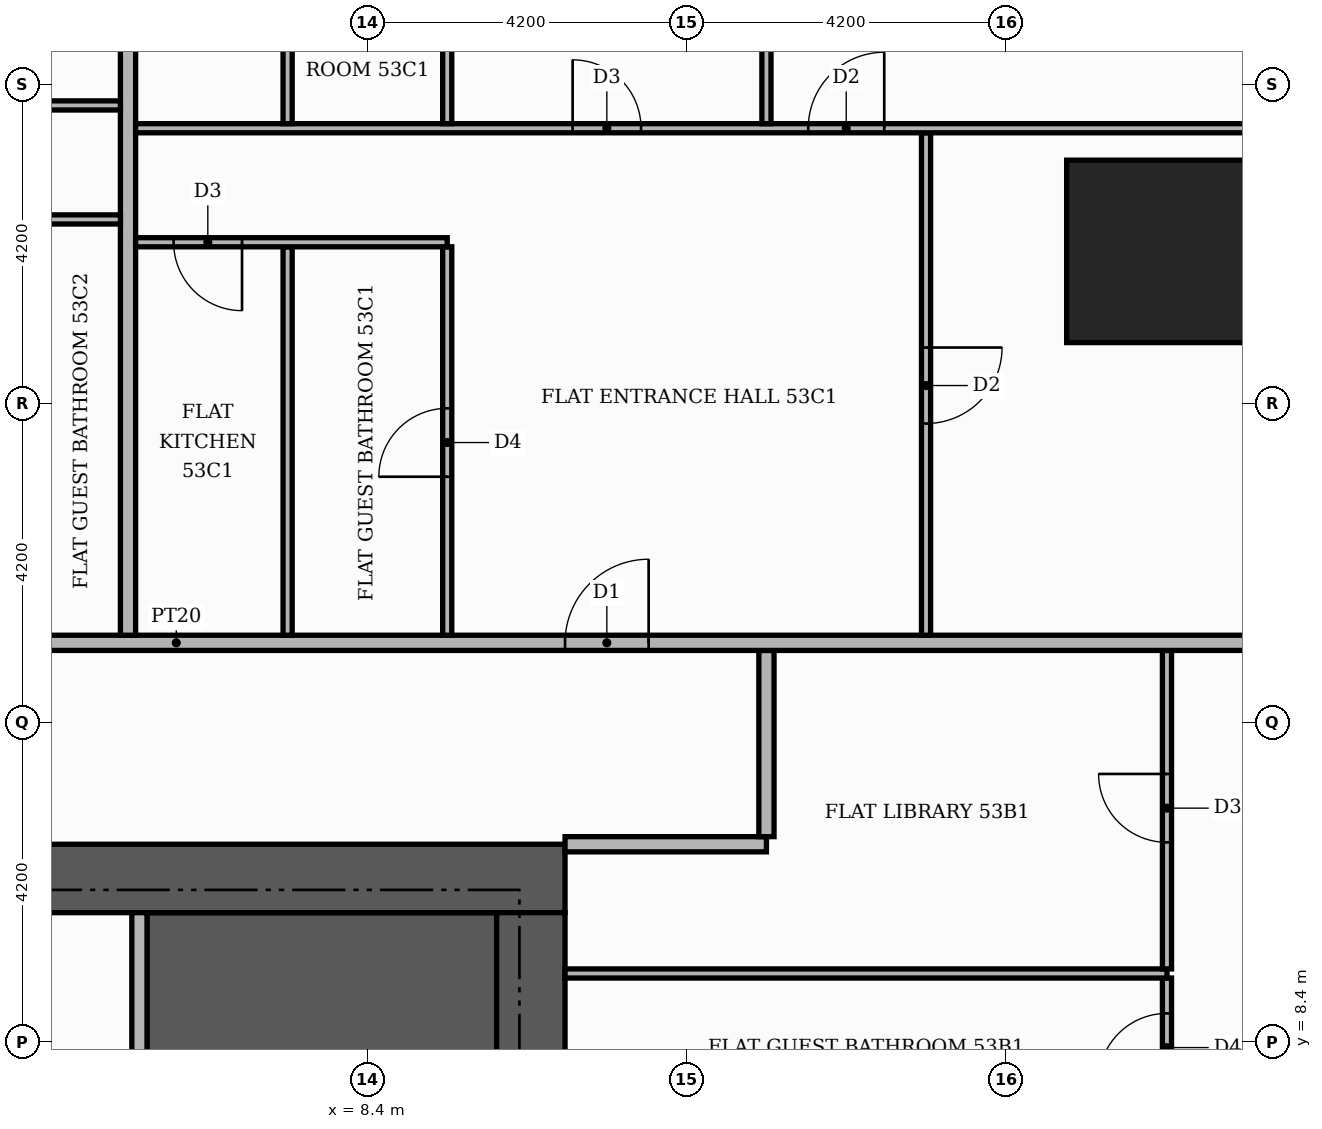
"""IFC4 building model, lengths in metres.
Left out: names, types, materials, properties, quantities, classifications, styles, units other than length and angle.
Written with IfcOpenShell. Run it as: python <this file> out.ifc"""

import sys

from ifc_helpers import new_model, si_unit, direction, frame, frame_2d, origin, origin_2d, place, context, subcontext, project, spatial, rectangle, extrude, element, fill, save


model = new_model("IFC4")
c1 = context("Model", 3, precision=1e-05, world=origin(), true_north=direction((0.0, 1.0)))
c2 = subcontext(c1, "Body", "Model", "MODEL_VIEW")
j1 = project(units=[si_unit("LENGTHUNIT", "METRE"), si_unit("PLANEANGLEUNIT", "RADIAN")], contexts=[c1])
p1 = place(None, origin())
s1 = spatial("IfcSite", under=j1, at=p1, CompositionType="ELEMENT")
p2 = place(p1, origin())
s2 = spatial("IfcBuilding", under=s1, at=p2, CompositionType="ELEMENT")
p3 = place(p2, frame((0.0, 0.0, 223.5)))
s3 = spatial("IfcBuildingStorey", under=s2, at=p3, CompositionType="ELEMENT", Elevation=223.5)
p4 = place(p3, frame((5.5, 9.15, 0.0), z_axis=(0.0, 0.0, 1.0), x_axis=(1.0, 0.0, 0.0)))
e1 = element("IfcWall", 1, at=p4, inside=s3, PredefinedType="SHEAR", context=c2, shape_type="SweptSolid", body=[
    extrude(rectangle(XDim=4.6, YDim=1.9, at=frame_2d((2.3, 0.0))), origin(), (0.0, 0.0, 1.0), 3.48),
])
p5 = place(p3, frame((-11.0, 10.55, 0.0), z_axis=(0.0, 0.0, 1.0), x_axis=(1.0, 0.0, 0.0)))
e2 = element("IfcWall", 2, at=p5, inside=s3, PredefinedType="SHEAR", context=c2, shape_type="SweptSolid", body=[
    extrude(rectangle(XDim=22.0, YDim=0.9, at=frame_2d((11.0, 0.0))), origin(), (0.0, 0.0, 1.0), 3.48),
])
p6 = place(p5, frame((13.3, 0.0, 0.0)))
e3 = element("IfcOpeningElement", 3, at=p6, cuts=e2, PredefinedType="OPENING", context=c2, shape_type="SweptSolid", body=[
    extrude(rectangle(XDim=1.8, YDim=2.2, at=frame_2d((0.9, 1.1))), frame((0.0, 0.46, 0.0), z_axis=(0.0, -1.0, 0.0), x_axis=(1.0, 0.0, 0.0)), (0.0, 0.0, 1.0), 0.92),
])
p7 = place(p3, frame((10.55, -10.1, 0.0), z_axis=(0.0, 0.0, 1.0), x_axis=(0.0, 1.0, 0.0)))
e4 = element("IfcWall", 4, at=p7, inside=s3, PredefinedType="SHEAR", context=c2, shape_type="SweptSolid", body=[
    extrude(rectangle(XDim=20.2, YDim=0.9, at=frame_2d((10.1, 0.0))), origin(), (0.0, 0.0, 1.0), 3.48),
])
p8 = place(p3, frame((18.8, 18.8, 0.0), z_axis=(0.0, 0.0, 1.0), x_axis=(1.0, 0.0, 0.0)))
e5 = element("IfcColumn", 5, at=p8, inside=s3, PredefinedType="COLUMN", context=c2, shape_type="SweptSolid", body=[
    extrude(rectangle(XDim=2.4, YDim=2.4, at=origin_2d()), origin(), (0.0, 0.0, 1.0), 3.9),
])
p9 = place(p3, frame((5.4, 5.5, 0.0), z_axis=(0.0, 0.0, 1.0), x_axis=(0.0, 1.0, 0.0)))
e6 = element("IfcWall", 6, at=p9, inside=s3, PredefinedType="PARTITIONING", context=c2, shape_type="SweptSolid", body=[
    extrude(rectangle(XDim=4.6, YDim=0.2, at=frame_2d((2.3, 0.0))), origin(), (0.0, 0.0, 1.0), 3.48),
])
p10 = place(p9, frame((0.25, 0.0, 0.0)))
e7 = element("IfcOpeningElement", 7, at=p10, cuts=e6, PredefinedType="OPENING", context=c2, shape_type="SweptSolid", body=[
    extrude(rectangle(XDim=1.0, YDim=2.1, at=frame_2d((0.5, 1.05))), frame((0.0, 0.11, 0.0), z_axis=(0.0, -1.0, 0.0), x_axis=(1.0, 0.0, 0.0)), (0.0, 0.0, 1.0), 0.22),
])
p11 = place(p3, frame((18.92, 7.41, 0.0), z_axis=(0.0, 0.0, 1.0), x_axis=(0.0, 1.0, 0.0)))
e8 = element("IfcWall", 8, at=p11, inside=s3, PredefinedType="PARTITIONING", context=c2, shape_type="SweptSolid", body=[
    extrude(rectangle(XDim=1.83, YDim=0.12, at=frame_2d((0.915, 0.0))), origin(), (0.0, 0.0, 1.0), 3.48),
])
p12 = place(p11, frame((0.465, 0.0, 0.0)))
e9 = element("IfcOpeningElement", 9, at=p12, cuts=e8, PredefinedType="OPENING", context=c2, shape_type="SweptSolid", body=[
    extrude(rectangle(XDim=0.9, YDim=2.1, at=frame_2d((0.45, 1.05))), frame((0.0, 0.07, 0.0), z_axis=(0.0, -1.0, 0.0), x_axis=(1.0, 0.0, 0.0)), (0.0, 0.0, 1.0), 0.14),
])
p13 = place(p3, frame((11.0, 9.3, 0.0), z_axis=(0.0, 0.0, 1.0), x_axis=(1.0, 0.0, 0.0)))
e10 = element("IfcWall", 10, at=p13, inside=s3, PredefinedType="PARTITIONING", context=c2, shape_type="SweptSolid", body=[
    extrude(rectangle(XDim=7.92, YDim=0.12, at=frame_2d((3.96, 0.0))), origin(), (0.0, 0.0, 1.0), 3.48),
])
p14 = place(p3, frame((18.92, 9.36, 0.0), z_axis=(0.0, 0.0, 1.0), x_axis=(0.0, 1.0, 0.0)))
e11 = element("IfcWall", 11, at=p14, inside=s3, PredefinedType="PARTITIONING", context=c2, shape_type="SweptSolid", body=[
    extrude(rectangle(XDim=4.19, YDim=0.12, at=frame_2d((2.095, 0.0))), origin(), (0.0, 0.0, 1.0), 3.48),
])
p15 = place(p14, frame((1.665, 0.0, 0.0)))
e12 = element("IfcOpeningElement", 12, at=p15, cuts=e11, PredefinedType="OPENING", context=c2, shape_type="SweptSolid", body=[
    extrude(rectangle(XDim=0.9, YDim=2.1, at=frame_2d((0.45, 1.05))), frame((0.0, 0.07, 0.0), z_axis=(0.0, -1.0, 0.0), x_axis=(1.0, 0.0, 0.0)), (0.0, 0.0, 1.0), 0.14),
])
p16 = place(p3, frame((11.0, 11.0, 0.0), z_axis=(0.0, 0.0, 1.0), x_axis=(1.0, 0.0, 0.0)))
e13 = element("IfcWall", 13, at=p16, inside=s3, PredefinedType="PARTITIONING", context=c2, shape_type="SweptSolid", body=[
    extrude(rectangle(XDim=2.65, YDim=0.2, at=frame_2d((1.325, 0.0))), origin(), (0.0, 0.0, 1.0), 3.48),
])
p17 = place(p3, frame((13.65, 11.1, 0.0), z_axis=(0.0, 0.0, 1.0), x_axis=(0.0, 1.0, 0.0)))
e14 = element("IfcWall", 14, at=p17, inside=s3, PredefinedType="PARTITIONING", context=c2, shape_type="SweptSolid", body=[
    extrude(rectangle(XDim=2.45, YDim=0.2, at=frame_2d((1.225, 0.0))), origin(), (0.0, 0.0, 1.0), 3.48),
])
p18 = place(p3, frame((-13.65, 13.65, 0.0), z_axis=(0.0, 0.0, 1.0), x_axis=(1.0, 0.0, 0.0)))
e15 = element("IfcWall", 15, at=p18, inside=s3, PredefinedType="PARTITIONING", context=c2, shape_type="SweptSolid", body=[
    extrude(rectangle(XDim=39.07, YDim=0.2, at=frame_2d((19.535, 0.0))), origin(), (0.0, 0.0, 1.0), 3.48),
])
p19 = place(p18, frame((24.65, 0.0, 0.0)))
e16 = element("IfcOpeningElement", 16, at=p19, cuts=e15, PredefinedType="OPENING", context=c2, shape_type="SweptSolid", body=[
    extrude(rectangle(XDim=1.1, YDim=2.4, at=frame_2d((0.55, 1.2))), frame((0.0, 0.11, 0.0), z_axis=(0.0, -1.0, 0.0), x_axis=(1.0, 0.0, 0.0)), (0.0, 0.0, 1.0), 0.22),
])
p20 = place(p18, frame((14.15, 0.0, 0.0)))
e17 = element("IfcOpeningElement", 17, at=p20, cuts=e15, PredefinedType="OPENING", context=c2, shape_type="SweptSolid", body=[
    extrude(rectangle(XDim=1.1, YDim=2.4, at=frame_2d((0.55, 1.2))), frame((0.0, 0.11, 0.0), z_axis=(0.0, -1.0, 0.0), x_axis=(1.0, 0.0, 0.0)), (0.0, 0.0, 1.0), 0.22),
])
p21 = place(p3, frame((5.25, 13.75, 0.0), z_axis=(0.0, 0.0, 1.0), x_axis=(0.0, 1.0, 0.0)))
e18 = element("IfcWall", 18, at=p21, inside=s3, PredefinedType="PARTITIONING", context=c2, shape_type="SweptSolid", body=[
    extrude(rectangle(XDim=11.67, YDim=0.2, at=frame_2d((5.835, 0.0))), origin(), (0.0, 0.0, 1.0), 3.48),
])
p22 = place(p3, frame((7.35, 13.75, 0.0), z_axis=(0.0, 0.0, 1.0), x_axis=(0.0, 1.0, 0.0)))
e19 = element("IfcWall", 19, at=p22, inside=s3, PredefinedType="PARTITIONING", context=c2, shape_type="SweptSolid", body=[
    extrude(rectangle(XDim=5.11, YDim=0.12, at=frame_2d((2.555, 0.0))), origin(), (0.0, 0.0, 1.0), 3.48),
])
p23 = place(p3, frame((9.45, 13.75, 0.0), z_axis=(0.0, 0.0, 1.0), x_axis=(0.0, 1.0, 0.0)))
e20 = element("IfcWall", 20, at=p23, inside=s3, PredefinedType="PARTITIONING", context=c2, shape_type="SweptSolid", body=[
    extrude(rectangle(XDim=5.11, YDim=0.12, at=frame_2d((2.555, 0.0))), origin(), (0.0, 0.0, 1.0), 3.48),
])
p24 = place(p23, frame((2.085, 0.0, 0.0)))
e21 = element("IfcOpeningElement", 21, at=p24, cuts=e20, PredefinedType="OPENING", context=c2, shape_type="SweptSolid", body=[
    extrude(rectangle(XDim=0.9, YDim=2.1, at=frame_2d((0.45, 1.05))), frame((0.0, 0.07, 0.0), z_axis=(0.0, -1.0, 0.0), x_axis=(1.0, 0.0, 0.0)), (0.0, 0.0, 1.0), 0.14),
])
p25 = place(p3, frame((15.75, 13.75, 0.0), z_axis=(0.0, 0.0, 1.0), x_axis=(0.0, 1.0, 0.0)))
e22 = element("IfcWall", 22, at=p25, inside=s3, PredefinedType="PARTITIONING", context=c2, shape_type="SweptSolid", body=[
    extrude(rectangle(XDim=6.61, YDim=0.12, at=frame_2d((3.305, 0.0))), origin(), (0.0, 0.0, 1.0), 3.48),
])
p26 = place(p25, frame((2.785, 0.0, 0.0)))
e23 = element("IfcOpeningElement", 23, at=p26, cuts=e22, PredefinedType="OPENING", context=c2, shape_type="SweptSolid", body=[
    extrude(rectangle(XDim=1.0, YDim=2.1, at=frame_2d((0.5, 1.05))), frame((0.0, 0.07, 0.0), z_axis=(0.0, -1.0, 0.0), x_axis=(1.0, 0.0, 0.0)), (0.0, 0.0, 1.0), 0.14),
])
p27 = place(p3, frame((5.35, 18.92, 0.0), z_axis=(0.0, 0.0, 1.0), x_axis=(1.0, 0.0, 0.0)))
e24 = element("IfcWall", 24, at=p27, inside=s3, PredefinedType="PARTITIONING", context=c2, shape_type="SweptSolid", body=[
    extrude(rectangle(XDim=4.1, YDim=0.12, at=frame_2d((2.05, 0.0))), origin(), (0.0, 0.0, 1.0), 3.48),
])
p28 = place(p27, frame((0.5, 0.0, 0.0)))
e25 = element("IfcOpeningElement", 25, at=p28, cuts=e24, PredefinedType="OPENING", context=c2, shape_type="SweptSolid", body=[
    extrude(rectangle(XDim=0.9, YDim=2.1, at=frame_2d((0.45, 1.05))), frame((0.0, 0.07, 0.0), z_axis=(0.0, -1.0, 0.0), x_axis=(1.0, 0.0, 0.0)), (0.0, 0.0, 1.0), 0.14),
])
p29 = place(p3, frame((3.15, 19.22, 0.0), z_axis=(0.0, 0.0, 1.0), x_axis=(1.0, 0.0, 0.0)))
e26 = element("IfcWall", 26, at=p29, inside=s3, PredefinedType="PARTITIONING", context=c2, shape_type="SweptSolid", body=[
    extrude(rectangle(XDim=2.0, YDim=0.12, at=frame_2d((1.0, 0.0))), origin(), (0.0, 0.0, 1.0), 3.48),
])
p30 = place(p3, frame((5.35, 20.42, 0.0), z_axis=(0.0, 0.0, 1.0), x_axis=(1.0, 0.0, 0.0)))
e27 = element("IfcWall", 27, at=p30, inside=s3, PredefinedType="PARTITIONING", context=c2, shape_type="SweptSolid", body=[
    extrude(rectangle(XDim=15.869, YDim=0.12, at=frame_2d((7.935, 0.0))), origin(), (0.0, 0.0, 1.0), 3.48),
])
p31 = place(p30, frame((8.85, 0.0, 0.0)))
e28 = element("IfcOpeningElement", 28, at=p31, cuts=e27, PredefinedType="OPENING", context=c2, shape_type="SweptSolid", body=[
    extrude(rectangle(XDim=1.0, YDim=2.1, at=frame_2d((0.5, 1.05))), frame((0.0, 0.07, 0.0), z_axis=(0.0, -1.0, 0.0), x_axis=(1.0, 0.0, 0.0)), (0.0, 0.0, 1.0), 0.14),
])
p32 = place(p30, frame((5.75, 0.0, 0.0)))
e29 = element("IfcOpeningElement", 29, at=p32, cuts=e27, PredefinedType="OPENING", context=c2, shape_type="SweptSolid", body=[
    extrude(rectangle(XDim=0.9, YDim=2.1, at=frame_2d((0.45, 1.05))), frame((0.0, 0.07, 0.0), z_axis=(0.0, -1.0, 0.0), x_axis=(1.0, 0.0, 0.0)), (0.0, 0.0, 1.0), 0.14),
])
p33 = place(p3, frame((7.35, 20.48, 0.0), z_axis=(0.0, 0.0, 1.0), x_axis=(0.0, 1.0, 0.0)))
e30 = element("IfcWall", 30, at=p33, inside=s3, PredefinedType="PARTITIONING", context=c2, shape_type="SweptSolid", body=[
    extrude(rectangle(XDim=4.94, YDim=0.12, at=frame_2d((2.47, 0.0))), origin(), (0.0, 0.0, 1.0), 3.48),
])
p34 = place(p33, frame((2.14, 0.0, 0.0)))
e31 = element("IfcOpeningElement", 31, at=p34, cuts=e30, PredefinedType="OPENING", context=c2, shape_type="SweptSolid", body=[
    extrude(rectangle(XDim=0.9, YDim=2.1, at=frame_2d((0.45, 1.05))), frame((0.0, 0.07, 0.0), z_axis=(0.0, -1.0, 0.0), x_axis=(1.0, 0.0, 0.0)), (0.0, 0.0, 1.0), 0.14),
])
p35 = place(p3, frame((9.45, 20.48, 0.0), z_axis=(0.0, 0.0, 1.0), x_axis=(0.0, 1.0, 0.0)))
e32 = element("IfcWall", 32, at=p35, inside=s3, PredefinedType="PARTITIONING", context=c2, shape_type="SweptSolid", body=[
    extrude(rectangle(XDim=4.94, YDim=0.12, at=frame_2d((2.47, 0.0))), origin(), (0.0, 0.0, 1.0), 3.48),
])
p36 = place(p35, frame((2.14, 0.0, 0.0)))
e33 = element("IfcOpeningElement", 33, at=p36, cuts=e32, PredefinedType="OPENING", context=c2, shape_type="SweptSolid", body=[
    extrude(rectangle(XDim=0.9, YDim=2.1, at=frame_2d((0.45, 1.05))), frame((0.0, 0.07, 0.0), z_axis=(0.0, -1.0, 0.0), x_axis=(1.0, 0.0, 0.0)), (0.0, 0.0, 1.0), 0.14),
])
p37 = place(p3, frame((13.65, 20.48, 0.0), z_axis=(0.0, 0.0, 1.0), x_axis=(0.0, 1.0, 0.0)))
e34 = element("IfcWall", 34, at=p37, inside=s3, PredefinedType="PARTITIONING", context=c2, shape_type="SweptSolid", body=[
    extrude(rectangle(XDim=4.94, YDim=0.12, at=frame_2d((2.47, 0.0))), origin(), (0.0, 0.0, 1.0), 3.48),
])
p38 = place(p3, frame((-13.55, 20.72, 0.0), z_axis=(0.0, 0.0, 1.0), x_axis=(1.0, 0.0, 0.0)))
e35 = element("IfcWall", 35, at=p38, inside=s3, PredefinedType="PARTITIONING", context=c2, shape_type="SweptSolid", body=[
    extrude(rectangle(XDim=18.7, YDim=0.12, at=frame_2d((9.35, 0.0))), origin(), (0.0, 0.0, 1.0), 3.48),
])
p39 = place(p38, frame((14.1, 0.0, 0.0)))
e36 = element("IfcOpeningElement", 36, at=p39, cuts=e35, PredefinedType="OPENING", context=c2, shape_type="SweptSolid", body=[
    extrude(rectangle(XDim=1.0, YDim=2.1, at=frame_2d((0.5, 1.05))), frame((0.0, 0.07, 0.0), z_axis=(0.0, -1.0, 0.0), x_axis=(1.0, 0.0, 0.0)), (0.0, 0.0, 1.0), 0.14),
])
p40 = place(p38, frame((6.8, 0.0, 0.0)))
e37 = element("IfcOpeningElement", 37, at=p40, cuts=e35, PredefinedType="OPENING", context=c2, shape_type="SweptSolid", body=[
    extrude(rectangle(XDim=0.9, YDim=2.1, at=frame_2d((0.45, 1.05))), frame((0.0, 0.07, 0.0), z_axis=(0.0, -1.0, 0.0), x_axis=(1.0, 0.0, 0.0)), (0.0, 0.0, 1.0), 0.14),
])
p41 = place(p12, origin())
e38 = element("IfcDoor", 38, at=p41, inside=s3, OperationType="SINGLE_SWING_LEFT", PredefinedType="DOOR", context=c2, shape_type="SweptSolid", body=[
    extrude(rectangle(XDim=0.9, YDim=2.1, at=frame_2d((0.45, 1.05))), frame((0.0, 0.025, 0.0), z_axis=(0.0, -1.0, 0.0), x_axis=(1.0, 0.0, 0.0)), (0.0, 0.0, 1.0), 0.05),
])
fill(e9, e38)
p42 = place(p15, origin())
e39 = element("IfcDoor", 39, at=p42, inside=s3, OperationType="SINGLE_SWING_RIGHT", PredefinedType="DOOR", context=c2, shape_type="SweptSolid", body=[
    extrude(rectangle(XDim=0.9, YDim=2.1, at=frame_2d((0.45, 1.05))), frame((0.0, 0.025, 0.0), z_axis=(0.0, -1.0, 0.0), x_axis=(1.0, 0.0, 0.0)), (0.0, 0.0, 1.0), 0.05),
])
fill(e12, e39)
p43 = place(p19, origin())
e40 = element("IfcDoor", 40, at=p43, inside=s3, OperationType="SINGLE_SWING_RIGHT", PredefinedType="DOOR", context=c2, shape_type="SweptSolid", body=[
    extrude(rectangle(XDim=1.1, YDim=2.4, at=frame_2d((0.55, 1.2))), frame((0.0, 0.025, 0.0), z_axis=(0.0, -1.0, 0.0), x_axis=(1.0, 0.0, 0.0)), (0.0, 0.0, 1.0), 0.05),
])
fill(e16, e40)
p44 = place(p26, frame((1.0, 0.0, 0.0), z_axis=(0.0, 0.0, 1.0), x_axis=(-1.0, 0.0, 0.0)))
e41 = element("IfcDoor", 41, at=p44, inside=s3, OperationType="SINGLE_SWING_RIGHT", PredefinedType="DOOR", context=c2, shape_type="SweptSolid", body=[
    extrude(rectangle(XDim=1.0, YDim=2.1, at=frame_2d((0.5, 1.05))), frame((0.0, 0.025, 0.0), z_axis=(0.0, -1.0, 0.0), x_axis=(1.0, 0.0, 0.0)), (0.0, 0.0, 1.0), 0.05),
])
fill(e23, e41)
p45 = place(p24, origin())
e42 = element("IfcDoor", 42, at=p45, inside=s3, OperationType="SINGLE_SWING_LEFT", PredefinedType="DOOR", context=c2, shape_type="SweptSolid", body=[
    extrude(rectangle(XDim=0.9, YDim=2.1, at=frame_2d((0.45, 1.05))), frame((0.0, 0.025, 0.0), z_axis=(0.0, -1.0, 0.0), x_axis=(1.0, 0.0, 0.0)), (0.0, 0.0, 1.0), 0.05),
])
fill(e21, e42)
p46 = place(p28, frame((0.9, 0.0, 0.0), z_axis=(0.0, 0.0, 1.0), x_axis=(-1.0, 0.0, 0.0)))
e43 = element("IfcDoor", 43, at=p46, inside=s3, OperationType="SINGLE_SWING_RIGHT", PredefinedType="DOOR", context=c2, shape_type="SweptSolid", body=[
    extrude(rectangle(XDim=0.9, YDim=2.1, at=frame_2d((0.45, 1.05))), frame((0.0, 0.025, 0.0), z_axis=(0.0, -1.0, 0.0), x_axis=(1.0, 0.0, 0.0)), (0.0, 0.0, 1.0), 0.05),
])
fill(e25, e43)
p47 = place(p31, origin())
e44 = element("IfcDoor", 44, at=p47, inside=s3, OperationType="SINGLE_SWING_RIGHT", PredefinedType="DOOR", context=c2, shape_type="SweptSolid", body=[
    extrude(rectangle(XDim=1.0, YDim=2.1, at=frame_2d((0.5, 1.05))), frame((0.0, 0.025, 0.0), z_axis=(0.0, -1.0, 0.0), x_axis=(1.0, 0.0, 0.0)), (0.0, 0.0, 1.0), 0.05),
])
fill(e28, e44)
p48 = place(p32, origin())
e45 = element("IfcDoor", 45, at=p48, inside=s3, OperationType="SINGLE_SWING_LEFT", PredefinedType="DOOR", context=c2, shape_type="SweptSolid", body=[
    extrude(rectangle(XDim=0.9, YDim=2.1, at=frame_2d((0.45, 1.05))), frame((0.0, 0.025, 0.0), z_axis=(0.0, -1.0, 0.0), x_axis=(1.0, 0.0, 0.0)), (0.0, 0.0, 1.0), 0.05),
])
fill(e29, e45)
save(model, sys.argv[1])
